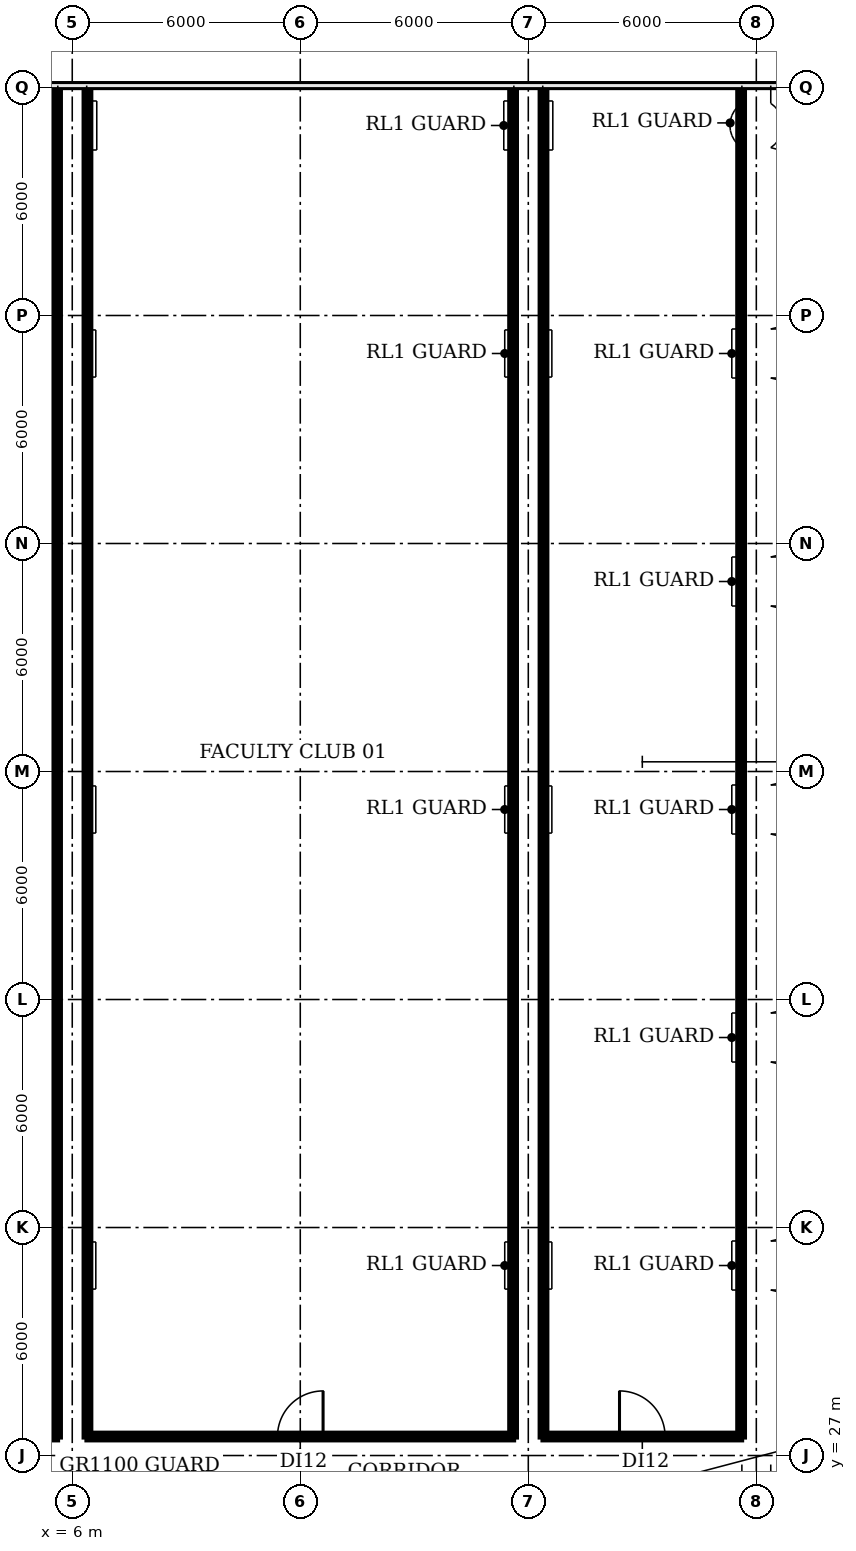
"""IFC4 building model, lengths in metres.
Left out: names, types, materials, properties, quantities, classifications, styles, units other than length and angle.
Written with IfcOpenShell. Run it as: python <this file> out.ifc"""

import sys

from ifc_helpers import new_model, si_unit, direction, frame, frame_2d, origin, place, context, subcontext, project, spatial, rectangle, extrude, element, fill, save


model = new_model("IFC4")
c1 = context("Model", 3, precision=1e-05, world=origin(), true_north=direction((0.0, 1.0)))
c2 = subcontext(c1, "Body", "Model", "MODEL_VIEW")
j1 = project(units=[si_unit("LENGTHUNIT", "METRE"), si_unit("PLANEANGLEUNIT", "RADIAN")], contexts=[c1])
p1 = place(None, origin())
s1 = spatial("IfcSite", under=j1, at=p1, CompositionType="ELEMENT")
p2 = place(p1, origin())
s2 = spatial("IfcBuilding", under=s1, at=p2, CompositionType="ELEMENT")
p3 = place(p2, frame((0.0, 0.0, 79.4)))
s3 = spatial("IfcBuildingStorey", under=s2, at=p3, CompositionType="ELEMENT", Elevation=79.4)
p4 = place(p3, frame((3.3, 27.5, 0.0), z_axis=(0.0, 0.0, 1.0), x_axis=(1.0, 0.0, 0.0)))
e1 = element("IfcWall", 1, at=p4, inside=s3, PredefinedType="PARTITIONING", context=c2, shape_type="SweptSolid", body=[
    extrude(rectangle(XDim=2.3, YDim=0.15, at=frame_2d((1.15, 0.0))), origin(), (0.0, 0.0, 1.0), 6.33),
])
p5 = place(p3, frame((5.6, 27.5, 0.0), z_axis=(0.0, 0.0, 1.0), x_axis=(0.0, 1.0, 0.0)))
e2 = element("IfcWall", 2, at=p5, inside=s3, PredefinedType="PARTITIONING", context=c2, shape_type="SweptSolid", body=[
    extrude(rectangle(XDim=35.465, YDim=0.15, at=frame_2d((17.732, 0.0))), origin(), (0.0, 0.0, 1.0), 6.33),
])
p6 = place(p3, frame((6.4, 27.5, 0.0), z_axis=(0.0, 0.0, 1.0), x_axis=(0.0, 1.0, 0.0)))
e3 = element("IfcWall", 3, at=p6, inside=s3, PredefinedType="PARTITIONING", context=c2, shape_type="SweptSolid", body=[
    extrude(rectangle(XDim=35.5, YDim=0.15, at=frame_2d((17.75, 0.0))), origin(), (0.0, 0.0, 1.0), 6.33),
])
p7 = place(p3, frame((6.4, 27.5, 0.0), z_axis=(0.0, 0.0, 1.0), x_axis=(1.0, 0.0, 0.0)))
e4 = element("IfcWall", 4, at=p7, inside=s3, PredefinedType="PARTITIONING", context=c2, shape_type="SweptSolid", body=[
    extrude(rectangle(XDim=11.2, YDim=0.15, at=frame_2d((5.6, 0.0))), origin(), (0.0, 0.0, 1.0), 6.33),
])
p8 = place(p7, frame((5.0, 0.0, 0.0)))
e5 = element("IfcOpeningElement", 5, at=p8, cuts=e4, PredefinedType="OPENING", context=c2, shape_type="SweptSolid", body=[
    extrude(rectangle(XDim=1.2, YDim=2.1, at=frame_2d((0.6, 1.05))), frame((0.0, 0.085, 0.0), z_axis=(0.0, -1.0, 0.0), x_axis=(1.0, 0.0, 0.0)), (0.0, 0.0, 1.0), 0.17),
])
p9 = place(p3, frame((17.6, 27.5, 0.0), z_axis=(0.0, 0.0, 1.0), x_axis=(0.0, 1.0, 0.0)))
e6 = element("IfcWall", 6, at=p9, inside=s3, PredefinedType="PARTITIONING", context=c2, shape_type="SweptSolid", body=[
    extrude(rectangle(XDim=35.5, YDim=0.15, at=frame_2d((17.75, 0.0))), origin(), (0.0, 0.0, 1.0), 6.33),
])
p10 = place(p3, frame((18.4, 27.5, 0.0), z_axis=(0.0, 0.0, 1.0), x_axis=(0.0, 1.0, 0.0)))
e7 = element("IfcWall", 7, at=p10, inside=s3, PredefinedType="PARTITIONING", context=c2, shape_type="SweptSolid", body=[
    extrude(rectangle(XDim=35.465, YDim=0.15, at=frame_2d((17.732, 0.0))), origin(), (0.0, 0.0, 1.0), 6.33),
])
p11 = place(p3, frame((18.4, 27.5, 0.0), z_axis=(0.0, 0.0, 1.0), x_axis=(1.0, 0.0, 0.0)))
e8 = element("IfcWall", 8, at=p11, inside=s3, PredefinedType="PARTITIONING", context=c2, shape_type="SweptSolid", body=[
    extrude(rectangle(XDim=5.2, YDim=0.15, at=frame_2d((2.6, 0.0))), origin(), (0.0, 0.0, 1.0), 6.33),
])
p12 = place(p11, frame((2.0, 0.0, 0.0)))
e9 = element("IfcOpeningElement", 9, at=p12, cuts=e8, PredefinedType="OPENING", context=c2, shape_type="SweptSolid", body=[
    extrude(rectangle(XDim=1.2, YDim=2.1, at=frame_2d((0.6, 1.05))), frame((0.0, 0.085, 0.0), z_axis=(0.0, -1.0, 0.0), x_axis=(1.0, 0.0, 0.0)), (0.0, 0.0, 1.0), 0.17),
])
p13 = place(p3, frame((23.6, 27.5, 0.0), z_axis=(0.0, 0.0, 1.0), x_axis=(0.0, 1.0, 0.0)))
e10 = element("IfcWall", 10, at=p13, inside=s3, PredefinedType="PARTITIONING", context=c2, shape_type="SweptSolid", body=[
    extrude(rectangle(XDim=35.5, YDim=0.15, at=frame_2d((17.75, 0.0))), origin(), (0.0, 0.0, 1.0), 6.33),
])
p14 = place(p8, origin())
e11 = element("IfcDoor", 11, at=p14, inside=s3, OperationType="SINGLE_SWING_RIGHT", PredefinedType="DOOR", context=c2, shape_type="SweptSolid", body=[
    extrude(rectangle(XDim=1.2, YDim=2.1, at=frame_2d((0.6, 1.05))), frame((0.0, 0.025, 0.0), z_axis=(0.0, -1.0, 0.0), x_axis=(1.0, 0.0, 0.0)), (0.0, 0.0, 1.0), 0.05),
])
fill(e5, e11)
p15 = place(p12, origin())
e12 = element("IfcDoor", 12, at=p15, inside=s3, OperationType="SINGLE_SWING_LEFT", PredefinedType="DOOR", context=c2, shape_type="SweptSolid", body=[
    extrude(rectangle(XDim=1.2, YDim=2.1, at=frame_2d((0.6, 1.05))), frame((0.0, 0.025, 0.0), z_axis=(0.0, -1.0, 0.0), x_axis=(1.0, 0.0, 0.0)), (0.0, 0.0, 1.0), 0.05),
])
fill(e9, e12)
save(model, sys.argv[1])
